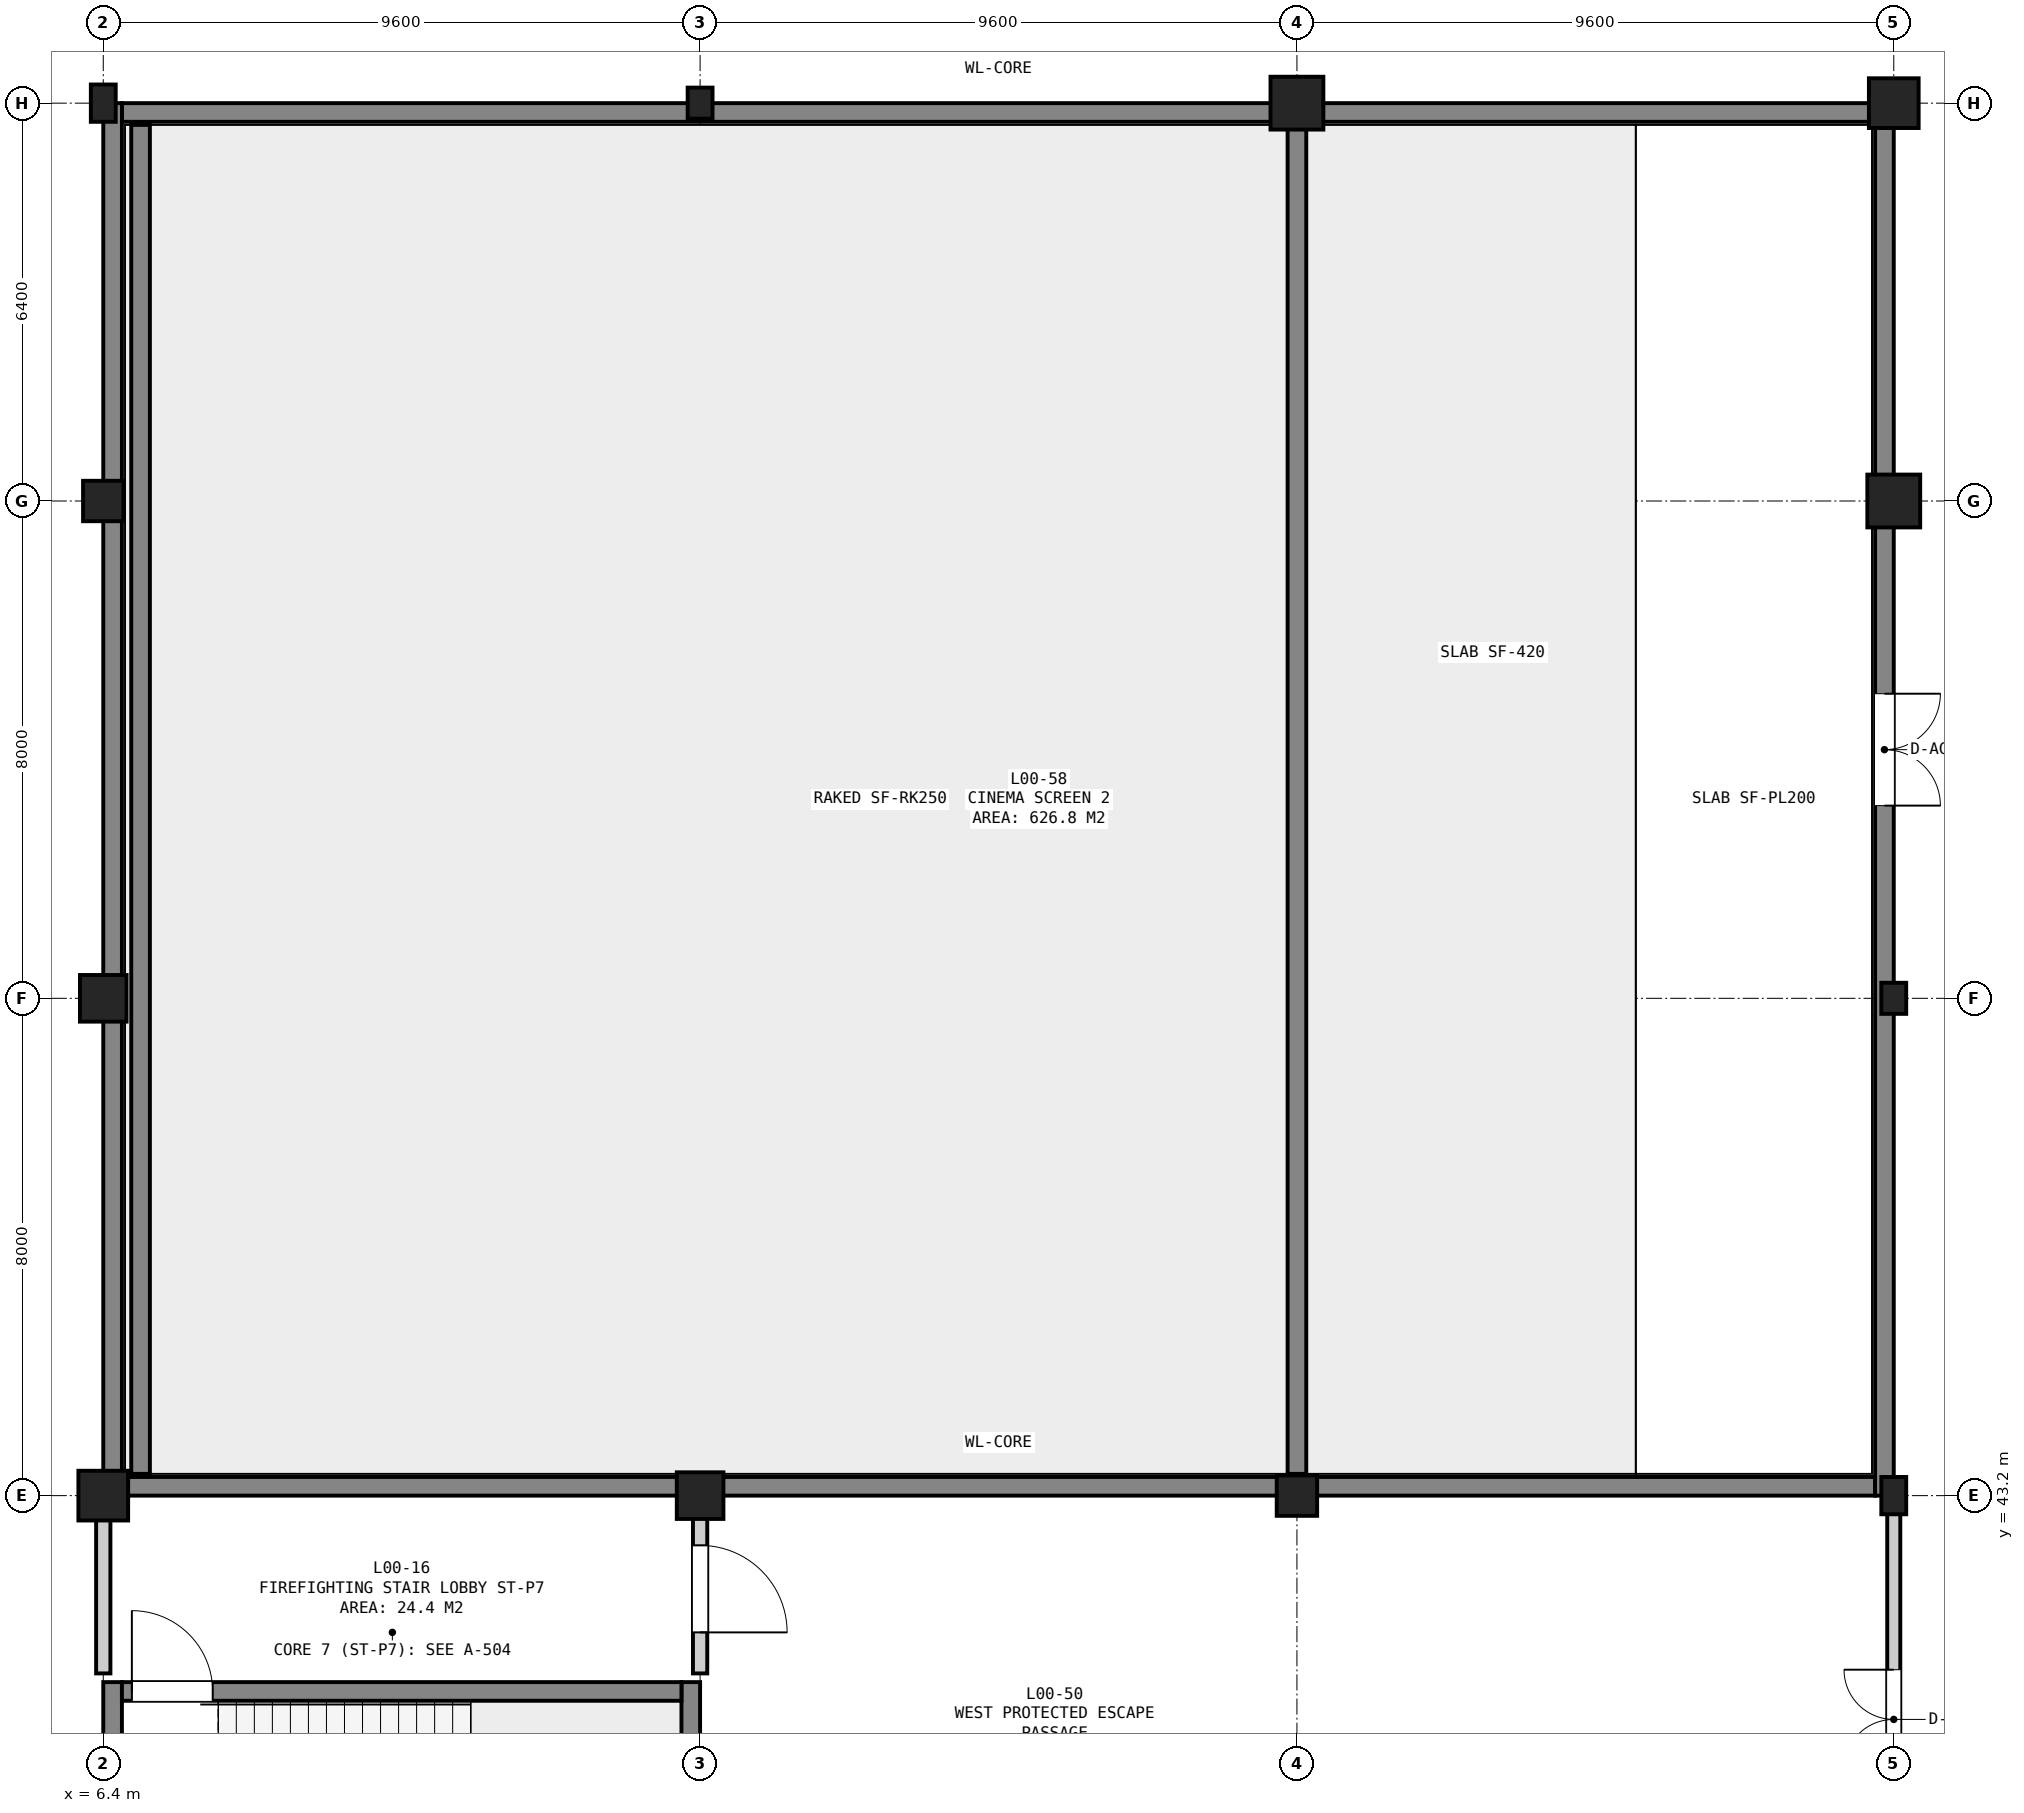
"""IFC4 building model, lengths in metres.
Left out: names, types, materials, properties, quantities, classifications, styles, units other than length and angle.
Written with IfcOpenShell. Run it as: python <this file> out.ifc"""

import sys

from ifc_helpers import new_model, si_unit, direction, frame, frame_2d, origin, origin_2d, place, context, subcontext, project, spatial, rectangle, extrude, element, fill, save


model = new_model("IFC4")
c1 = context("Model", 3, precision=1e-05, world=origin(), true_north=direction((0.0, 1.0)))
c2 = subcontext(c1, "Body", "Model", "MODEL_VIEW")
j1 = project(units=[si_unit("LENGTHUNIT", "METRE"), si_unit("PLANEANGLEUNIT", "RADIAN")], contexts=[c1])
p1 = place(None, origin())
s1 = spatial("IfcSite", under=j1, at=p1, CompositionType="ELEMENT")
p2 = place(p1, origin())
s2 = spatial("IfcBuilding", under=s1, at=p2, CompositionType="ELEMENT")
p3 = place(p2, origin())
s3 = spatial("IfcBuildingStorey", under=s2, at=p3, CompositionType="ELEMENT", Elevation=0.0)
p4 = place(p3, frame((6.4, 43.2, 0.0), z_axis=(0.0, 0.0, 1.0), x_axis=(1.0, 0.0, 0.0)))
e1 = element("IfcColumn", 1, at=p4, inside=s3, PredefinedType="COLUMN", context=c2, shape_type="SweptSolid", body=[
    extrude(rectangle(XDim=0.8, YDim=0.8, at=origin_2d()), origin(), (0.0, 0.0, 1.0), 5.4),
])
p5 = place(p3, frame((6.4, 51.2, 0.0), z_axis=(0.0, 0.0, 1.0), x_axis=(1.0, 0.0, 0.0)))
e2 = element("IfcColumn", 2, at=p5, inside=s3, PredefinedType="COLUMN", context=c2, shape_type="SweptSolid", body=[
    extrude(rectangle(XDim=0.75, YDim=0.75, at=origin_2d()), origin(), (0.0, 0.0, 1.0), 5.4),
])
p6 = place(p3, frame((6.4, 59.2, 0.0), z_axis=(0.0, 0.0, 1.0), x_axis=(1.0, 0.0, 0.0)))
e3 = element("IfcColumn", 3, at=p6, inside=s3, PredefinedType="COLUMN", context=c2, shape_type="SweptSolid", body=[
    extrude(rectangle(XDim=0.65, YDim=0.65, at=origin_2d()), origin(), (0.0, 0.0, 1.0), 5.4),
])
p7 = place(p3, frame((6.4, 65.6, 0.0), z_axis=(0.0, 0.0, 1.0), x_axis=(1.0, 0.0, 0.0)))
e4 = element("IfcColumn", 4, at=p7, inside=s3, PredefinedType="COLUMN", context=c2, shape_type="SweptSolid", body=[
    extrude(rectangle(XDim=0.4, YDim=0.6, at=origin_2d()), origin(), (0.0, 0.0, 1.0), 5.4),
])
p8 = place(p3, frame((16.0, 43.2, 0.0), z_axis=(0.0, 0.0, 1.0), x_axis=(1.0, 0.0, 0.0)))
e5 = element("IfcColumn", 5, at=p8, inside=s3, PredefinedType="COLUMN", context=c2, shape_type="SweptSolid", body=[
    extrude(rectangle(XDim=0.75, YDim=0.75, at=origin_2d()), origin(), (0.0, 0.0, 1.0), 5.4),
])
p9 = place(p3, frame((16.0, 65.6, 0.0), z_axis=(0.0, 0.0, 1.0), x_axis=(1.0, 0.0, 0.0)))
e6 = element("IfcColumn", 6, at=p9, inside=s3, PredefinedType="COLUMN", context=c2, shape_type="SweptSolid", body=[
    extrude(rectangle(XDim=0.4, YDim=0.5, at=origin_2d()), origin(), (0.0, 0.0, 1.0), 5.4),
])
p10 = place(p3, frame((25.6, 43.2, 0.0), z_axis=(0.0, 0.0, 1.0), x_axis=(1.0, 0.0, 0.0)))
e7 = element("IfcColumn", 7, at=p10, inside=s3, PredefinedType="COLUMN", context=c2, shape_type="SweptSolid", body=[
    extrude(rectangle(XDim=0.65, YDim=0.65, at=origin_2d()), origin(), (0.0, 0.0, 1.0), 5.4),
])
p11 = place(p3, frame((25.6, 65.6, 0.0), z_axis=(0.0, 0.0, 1.0), x_axis=(1.0, 0.0, 0.0)))
e8 = element("IfcColumn", 8, at=p11, inside=s3, PredefinedType="COLUMN", context=c2, shape_type="SweptSolid", body=[
    extrude(rectangle(XDim=0.85, YDim=0.85, at=origin_2d()), origin(), (0.0, 0.0, 1.0), 5.4),
])
p12 = place(p3, frame((35.2, 43.2, 0.0), z_axis=(0.0, 0.0, 1.0), x_axis=(1.0, 0.0, 0.0)))
e9 = element("IfcColumn", 9, at=p12, inside=s3, PredefinedType="COLUMN", context=c2, shape_type="SweptSolid", body=[
    extrude(rectangle(XDim=0.4, YDim=0.6, at=origin_2d()), origin(), (0.0, 0.0, 1.0), 5.4),
])
p13 = place(p3, frame((35.2, 51.2, 0.0), z_axis=(0.0, 0.0, 1.0), x_axis=(1.0, 0.0, 0.0)))
e10 = element("IfcColumn", 10, at=p13, inside=s3, PredefinedType="COLUMN", context=c2, shape_type="SweptSolid", body=[
    extrude(rectangle(XDim=0.4, YDim=0.5, at=origin_2d()), origin(), (0.0, 0.0, 1.0), 5.4),
])
p14 = place(p3, frame((35.2, 59.2, 0.0), z_axis=(0.0, 0.0, 1.0), x_axis=(1.0, 0.0, 0.0)))
e11 = element("IfcColumn", 11, at=p14, inside=s3, PredefinedType="COLUMN", context=c2, shape_type="SweptSolid", body=[
    extrude(rectangle(XDim=0.85, YDim=0.85, at=origin_2d()), origin(), (0.0, 0.0, 1.0), 5.4),
])
p15 = place(p3, frame((35.2, 65.6, 0.0), z_axis=(0.0, 0.0, 1.0), x_axis=(1.0, 0.0, 0.0)))
e12 = element("IfcColumn", 12, at=p15, inside=s3, PredefinedType="COLUMN", context=c2, shape_type="SweptSolid", body=[
    extrude(rectangle(XDim=0.8, YDim=0.8, at=origin_2d()), origin(), (0.0, 0.0, 1.0), 5.4),
])
p16 = place(p3, frame((25.6, 43.55, 0.0), z_axis=(0.0, 0.0, 1.0), x_axis=(0.0, 1.0, 0.0)))
e13 = element("IfcWall", 13, at=p16, inside=s3, PredefinedType="SHEAR", context=c2, shape_type="SweptSolid", body=[
    extrude(rectangle(XDim=21.7, YDim=0.3, at=frame_2d((10.85, 0.0))), origin(), (0.0, 0.0, 1.0), 0.784),
])
p17 = place(p3, frame((7.0, 43.55, 0.0), z_axis=(0.0, 0.0, 1.0), x_axis=(0.0, 1.0, 0.0)))
e14 = element("IfcWall", 14, at=p17, inside=s3, PredefinedType="SHEAR", context=c2, shape_type="SweptSolid", body=[
    extrude(rectangle(XDim=21.7, YDim=0.3, at=frame_2d((10.85, 0.0))), origin(), (0.0, 0.0, 1.0), 3.597),
])
for number, where, z_axis, x_axis in (
    (15, (6.7, 43.35, 0.0), (0.0, 0.0, 1.0), (1.0, 0.0, 0.0)),
    (16, (6.7, 65.45, 0.0), (0.0, 0.0, 1.0), (1.0, 0.0, 0.0)),
):
    element("IfcWall", number, at=place(p3, frame(where, z_axis=z_axis, x_axis=x_axis)), inside=s3, PredefinedType="SHEAR", context=c2, shape_type="SweptSolid", body=[
        extrude(rectangle(XDim=28.2, YDim=0.3, at=frame_2d((14.1, 0.0))), origin(), (0.0, 0.0, 1.0), 5.08),
    ])
p18 = place(p3, frame((6.55, 43.2, 0.0), z_axis=(0.0, 0.0, 1.0), x_axis=(0.0, 1.0, 0.0)))
e17 = element("IfcWall", 17, at=p18, inside=s3, PredefinedType="SHEAR", context=c2, shape_type="SweptSolid", body=[
    extrude(rectangle(XDim=22.4, YDim=0.3, at=frame_2d((11.2, 0.0))), origin(), (0.0, 0.0, 1.0), 5.08),
])
p19 = place(p3, frame((35.05, 43.2, 0.0), z_axis=(0.0, 0.0, 1.0), x_axis=(0.0, 1.0, 0.0)))
e18 = element("IfcWall", 18, at=p19, inside=s3, PredefinedType="SHEAR", context=c2, shape_type="SweptSolid", body=[
    extrude(rectangle(XDim=22.4, YDim=0.3, at=frame_2d((11.2, 0.0))), origin(), (0.0, 0.0, 1.0), 5.08),
])
p20 = place(p19, frame((11.1, 0.0, 0.0)))
e19 = element("IfcOpeningElement", 19, at=p20, cuts=e18, PredefinedType="OPENING", context=c2, shape_type="SweptSolid", body=[
    extrude(rectangle(XDim=1.8, YDim=2.3, at=frame_2d((0.9, 1.15))), frame((0.0, 0.162, 0.0), z_axis=(0.0, -1.0, 0.0), x_axis=(1.0, 0.0, 0.0)), (0.0, 0.0, 1.0), 0.324),
])
for number, where, z_axis, x_axis in (
    (20, (6.55, 36.0, 0.0), (0.0, 0.0, 1.0), (0.0, 1.0, 0.0)),
    (21, (15.85, 36.0, 0.0), (0.0, 0.0, 1.0), (0.0, 1.0, 0.0)),
):
    element("IfcWall", number, at=place(p3, frame(where, z_axis=z_axis, x_axis=x_axis)), inside=s3, PredefinedType="SHEAR", context=c2, shape_type="SweptSolid", body=[
        extrude(rectangle(XDim=4.2, YDim=0.3, at=frame_2d((2.1, 0.0))), origin(), (0.0, 0.0, 1.0), 5.08),
    ])
p21 = place(p3, frame((6.7, 40.05, 0.0), z_axis=(0.0, 0.0, 1.0), x_axis=(1.0, 0.0, 0.0)))
e22 = element("IfcWall", 22, at=p21, inside=s3, PredefinedType="SHEAR", context=c2, shape_type="SweptSolid", body=[
    extrude(rectangle(XDim=9.0, YDim=0.3, at=frame_2d((4.5, 0.0))), origin(), (0.0, 0.0, 1.0), 5.08),
])
p22 = place(p21, frame((0.16, 0.0, 0.0)))
e23 = element("IfcOpeningElement", 23, at=p22, cuts=e22, PredefinedType="OPENING", context=c2, shape_type="SweptSolid", body=[
    extrude(rectangle(XDim=1.3, YDim=2.18, at=frame_2d((0.65, 1.09))), frame((0.0, 0.162, 0.0), z_axis=(0.0, -1.0, 0.0), x_axis=(1.0, 0.0, 0.0)), (0.0, 0.0, 1.0), 0.324),
])
p23 = place(p3, frame((6.4, 40.34, 0.0), z_axis=(0.0, 0.0, 1.0), x_axis=(0.0, 1.0, 0.0)))
e24 = element("IfcWall", 24, at=p23, inside=s3, PredefinedType="SOLIDWALL", context=c2, shape_type="SweptSolid", body=[
    extrude(rectangle(XDim=2.72, YDim=0.23, at=frame_2d((1.36, 0.0))), origin(), (0.0, 0.0, 1.0), 4.475),
])
p24 = place(p3, frame((16.0, 40.34, 0.0), z_axis=(0.0, 0.0, 1.0), x_axis=(0.0, 1.0, 0.0)))
e25 = element("IfcWall", 25, at=p24, inside=s3, PredefinedType="SOLIDWALL", context=c2, shape_type="SweptSolid", body=[
    extrude(rectangle(XDim=2.72, YDim=0.23, at=frame_2d((1.36, 0.0))), origin(), (0.0, 0.0, 1.0), 4.475),
])
p25 = place(p24, frame((0.66, 0.0, 0.0)))
e26 = element("IfcOpeningElement", 26, at=p25, cuts=e25, PredefinedType="OPENING", context=c2, shape_type="SweptSolid", body=[
    extrude(rectangle(XDim=1.4, YDim=2.2, at=frame_2d((0.7, 1.1))), frame((0.0, 0.127, 0.0), z_axis=(0.0, -1.0, 0.0), x_axis=(1.0, 0.0, 0.0)), (0.0, 0.0, 1.0), 0.254),
])
p26 = place(p3, frame((35.2, 36.14, 0.0), z_axis=(0.0, 0.0, 1.0), x_axis=(0.0, 1.0, 0.0)))
e27 = element("IfcWall", 27, at=p26, inside=s3, PredefinedType="SOLIDWALL", context=c2, shape_type="SweptSolid", body=[
    extrude(rectangle(XDim=6.92, YDim=0.21, at=frame_2d((3.46, 0.0))), origin(), (0.0, 0.0, 1.0), 4.375),
])
p27 = place(p26, frame((2.66, 0.0, 0.0)))
e28 = element("IfcOpeningElement", 28, at=p27, cuts=e27, PredefinedType="OPENING", context=c2, shape_type="SweptSolid", body=[
    extrude(rectangle(XDim=1.6, YDim=2.2, at=frame_2d((0.8, 1.1))), frame((0.0, 0.117, 0.0), z_axis=(0.0, -1.0, 0.0), x_axis=(1.0, 0.0, 0.0)), (0.0, 0.0, 1.0), 0.234),
])
p28 = place(p20, frame((1.8, 0.0, 0.0), z_axis=(0.0, 0.0, 1.0), x_axis=(-1.0, 0.0, 0.0)))
e29 = element("IfcDoor", 29, at=p28, inside=s3, OperationType="DOUBLE_DOOR_SINGLE_SWING", PredefinedType="DOOR", context=c2, shape_type="SweptSolid", body=[
    extrude(rectangle(XDim=1.8, YDim=2.3, at=frame_2d((0.9, 1.15))), frame((0.0, 0.025, 0.0), z_axis=(0.0, -1.0, 0.0), x_axis=(1.0, 0.0, 0.0)), (0.0, 0.0, 1.0), 0.05),
])
fill(e19, e29)
p29 = place(p22, origin())
e30 = element("IfcDoor", 30, at=p29, inside=s3, OperationType="SINGLE_SWING_LEFT", PredefinedType="DOOR", context=c2, shape_type="SweptSolid", body=[
    extrude(rectangle(XDim=1.3, YDim=2.18, at=frame_2d((0.65, 1.09))), frame((0.0, 0.025, 0.0), z_axis=(0.0, -1.0, 0.0), x_axis=(1.0, 0.0, 0.0)), (0.0, 0.0, 1.0), 0.05),
])
fill(e23, e30)
p30 = place(p25, frame((1.4, 0.0, 0.0), z_axis=(0.0, 0.0, 1.0), x_axis=(-1.0, 0.0, 0.0)))
e31 = element("IfcDoor", 31, at=p30, inside=s3, OperationType="SINGLE_SWING_RIGHT", PredefinedType="DOOR", context=c2, shape_type="SweptSolid", body=[
    extrude(rectangle(XDim=1.4, YDim=2.2, at=frame_2d((0.7, 1.1))), frame((0.0, 0.025, 0.0), z_axis=(0.0, -1.0, 0.0), x_axis=(1.0, 0.0, 0.0)), (0.0, 0.0, 1.0), 0.05),
])
fill(e26, e31)
p31 = place(p27, origin())
e32 = element("IfcDoor", 32, at=p31, inside=s3, OperationType="DOUBLE_DOOR_SINGLE_SWING", PredefinedType="DOOR", context=c2, shape_type="SweptSolid", body=[
    extrude(rectangle(XDim=1.6, YDim=2.2, at=frame_2d((0.8, 1.1))), frame((0.0, 0.025, 0.0), z_axis=(0.0, -1.0, 0.0), x_axis=(1.0, 0.0, 0.0)), (0.0, 0.0, 1.0), 0.05),
])
fill(e28, e32)
save(model, sys.argv[1])
